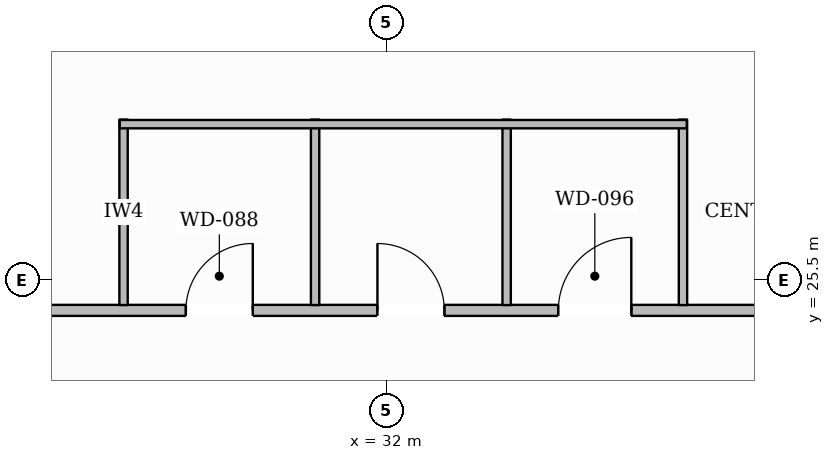
"""IFC4 building model, lengths in metres.
Left out: names, types, materials, properties, quantities, classifications, styles, units other than length and angle.
Written with IfcOpenShell. Run it as: python <this file> out.ifc"""

import sys

from ifc_helpers import new_model, si_unit, direction, frame, frame_2d, origin, place, context, subcontext, project, spatial, rectangle, extrude, element, fill, save


model = new_model("IFC4")
c1 = context("Model", 3, precision=1e-05, world=origin(), true_north=direction((0.0, 1.0)))
c2 = subcontext(c1, "Body", "Model", "MODEL_VIEW")
j1 = project(units=[si_unit("LENGTHUNIT", "METRE"), si_unit("PLANEANGLEUNIT", "RADIAN")], contexts=[c1])
p1 = place(None, origin())
s1 = spatial("IfcSite", under=j1, at=p1, CompositionType="ELEMENT")
p2 = place(p1, origin())
s2 = spatial("IfcBuilding", under=s1, at=p2, CompositionType="ELEMENT")
p3 = place(p2, frame((0.0, 0.0, 6.0)))
s3 = spatial("IfcBuildingStorey", under=s2, at=p3, CompositionType="ELEMENT", Elevation=6.0)
p4 = place(p3, frame((13.007, 15.062, 0.0), z_axis=(0.0, 0.0, 1.0), x_axis=(0.502349968378, 0.86466439112, 0.0)))
e1 = element("IfcWall", 1, at=p4, inside=s3, PredefinedType="STANDARD", context=c2, shape_type="SweptSolid", body=[
    extrude(rectangle(XDim=33.229, YDim=0.38, at=frame_2d((16.615, 0.0))), origin(), (0.0, 0.0, 1.0), 2.97),
])
p5 = place(p4, frame((29.24, 0.0, 0.65)))
e2 = element("IfcOpeningElement", 2, at=p5, cuts=e1, PredefinedType="OPENING", context=c2, shape_type="SweptSolid", body=[
    extrude(rectangle(XDim=1.65, YDim=1.75, at=frame_2d((0.825, 0.875))), frame((0.0, 0.2, 0.0), z_axis=(0.0, -1.0, 0.0), x_axis=(1.0, 0.0, 0.0)), (0.0, 0.0, 1.0), 0.4),
])
p6 = place(p4, frame((23.861, 0.0, 0.65)))
e3 = element("IfcOpeningElement", 3, at=p6, cuts=e1, PredefinedType="OPENING", context=c2, shape_type="SweptSolid", body=[
    extrude(rectangle(XDim=1.65, YDim=1.75, at=frame_2d((0.825, 0.875))), frame((0.0, 0.2, 0.0), z_axis=(0.0, -1.0, 0.0), x_axis=(1.0, 0.0, 0.0)), (0.0, 0.0, 1.0), 0.4),
])
p7 = place(p4, frame((13.101, 0.0, 0.65)))
e4 = element("IfcOpeningElement", 4, at=p7, cuts=e1, PredefinedType="OPENING", context=c2, shape_type="SweptSolid", body=[
    extrude(rectangle(XDim=1.65, YDim=1.75, at=frame_2d((0.825, 0.875))), frame((0.0, 0.2, 0.0), z_axis=(0.0, -1.0, 0.0), x_axis=(1.0, 0.0, 0.0)), (0.0, 0.0, 1.0), 0.4),
])
p8 = place(p4, frame((7.722, 0.0, 0.65)))
e5 = element("IfcOpeningElement", 5, at=p8, cuts=e1, PredefinedType="OPENING", context=c2, shape_type="SweptSolid", body=[
    extrude(rectangle(XDim=1.65, YDim=1.75, at=frame_2d((0.825, 0.875))), frame((0.0, 0.2, 0.0), z_axis=(0.0, -1.0, 0.0), x_axis=(1.0, 0.0, 0.0)), (0.0, 0.0, 1.0), 0.4),
])
p9 = place(p4, frame((2.342, 0.0, 0.65)))
e6 = element("IfcOpeningElement", 6, at=p9, cuts=e1, PredefinedType="OPENING", context=c2, shape_type="SweptSolid", body=[
    extrude(rectangle(XDim=1.65, YDim=1.75, at=frame_2d((0.825, 0.875))), frame((0.0, 0.2, 0.0), z_axis=(0.0, -1.0, 0.0), x_axis=(1.0, 0.0, 0.0)), (0.0, 0.0, 1.0), 0.4),
])
p10 = place(p3, frame((25.98, 25.1, 0.0), z_axis=(0.0, 0.0, 1.0), x_axis=(1.0, 0.0, 0.0)))
e7 = element("IfcWall", 7, at=p10, inside=s3, PredefinedType="PARTITIONING", context=c2, shape_type="SweptSolid", body=[
    extrude(rectangle(XDim=11.02, YDim=0.145, at=frame_2d((5.51, 0.0))), origin(), (0.0, 0.0, 1.0), 3.59),
])
p11 = place(p10, frame((3.38, 0.0, 0.0)))
e8 = element("IfcOpeningElement", 8, at=p11, cuts=e7, PredefinedType="OPENING", context=c2, shape_type="SweptSolid", body=[
    extrude(rectangle(XDim=0.88, YDim=2.1, at=frame_2d((0.44, 1.05))), frame((0.0, 0.083, 0.0), z_axis=(0.0, -1.0, 0.0), x_axis=(1.0, 0.0, 0.0)), (0.0, 0.0, 1.0), 0.165),
])
p12 = place(p10, frame((5.9, 0.0, 0.0)))
e9 = element("IfcOpeningElement", 9, at=p12, cuts=e7, PredefinedType="OPENING", context=c2, shape_type="SweptSolid", body=[
    extrude(rectangle(XDim=0.88, YDim=2.1, at=frame_2d((0.44, 1.05))), frame((0.0, 0.083, 0.0), z_axis=(0.0, -1.0, 0.0), x_axis=(1.0, 0.0, 0.0)), (0.0, 0.0, 1.0), 0.165),
])
p13 = place(p10, frame((8.28, 0.0, 0.0)))
e10 = element("IfcOpeningElement", 10, at=p13, cuts=e7, PredefinedType="OPENING", context=c2, shape_type="SweptSolid", body=[
    extrude(rectangle(XDim=0.96, YDim=2.1, at=frame_2d((0.48, 1.05))), frame((0.0, 0.083, 0.0), z_axis=(0.0, -1.0, 0.0), x_axis=(1.0, 0.0, 0.0)), (0.0, 0.0, 1.0), 0.165),
])
p14 = place(p3, frame((28.54, 25.17, 0.0), z_axis=(0.0, 0.0, 1.0), x_axis=(0.0, 1.0, 0.0)))
e11 = element("IfcWall", 11, at=p14, inside=s3, PredefinedType="PLUMBINGWALL", context=c2, shape_type="SweptSolid", body=[
    extrude(rectangle(XDim=2.44, YDim=0.11, at=frame_2d((1.22, 0.0))), origin(), (0.0, 0.0, 1.0), 3.057),
])
for number, where, z_axis, x_axis in (
    (12, (31.06, 25.17, 0.0), (0.0, 0.0, 1.0), (0.0, 1.0, 0.0)),
    (13, (33.58, 25.17, 0.0), (0.0, 0.0, 1.0), (0.0, 1.0, 0.0)),
    (14, (35.9, 25.17, 0.0), (0.0, 0.0, 1.0), (0.0, 1.0, 0.0)),
):
    element("IfcWall", number, at=place(p3, frame(where, z_axis=z_axis, x_axis=x_axis)), inside=s3, PredefinedType="PLUMBINGWALL", context=c2, shape_type="SweptSolid", body=[
        extrude(rectangle(XDim=2.44, YDim=0.11, at=frame_2d((1.22, 0.0))), origin(), (0.0, 0.0, 1.0), 3.59),
    ])
p15 = place(p3, frame((28.49, 27.55, 0.0), z_axis=(0.0, 0.0, 1.0), x_axis=(1.0, 0.0, 0.0)))
e15 = element("IfcWall", 15, at=p15, inside=s3, PredefinedType="PLUMBINGWALL", context=c2, shape_type="SweptSolid", body=[
    extrude(rectangle(XDim=7.46, YDim=0.11, at=frame_2d((3.73, 0.0))), origin(), (0.0, 0.0, 1.0), 3.59),
])
p16 = place(p11, origin())
e16 = element("IfcDoor", 16, at=p16, inside=s3, OperationType="SINGLE_SWING_RIGHT", PredefinedType="DOOR", context=c2, shape_type="SweptSolid", body=[
    extrude(rectangle(XDim=0.88, YDim=2.1, at=frame_2d((0.44, 1.05))), frame((0.0, 0.025, 0.0), z_axis=(0.0, -1.0, 0.0), x_axis=(1.0, 0.0, 0.0)), (0.0, 0.0, 1.0), 0.05),
])
fill(e8, e16)
p17 = place(p12, origin())
e17 = element("IfcDoor", 17, at=p17, inside=s3, OperationType="SINGLE_SWING_LEFT", PredefinedType="DOOR", context=c2, shape_type="SweptSolid", body=[
    extrude(rectangle(XDim=0.88, YDim=2.1, at=frame_2d((0.44, 1.05))), frame((0.0, 0.025, 0.0), z_axis=(0.0, -1.0, 0.0), x_axis=(1.0, 0.0, 0.0)), (0.0, 0.0, 1.0), 0.05),
])
fill(e9, e17)
p18 = place(p13, origin())
e18 = element("IfcDoor", 18, at=p18, inside=s3, OperationType="SINGLE_SWING_RIGHT", PredefinedType="DOOR", context=c2, shape_type="SweptSolid", body=[
    extrude(rectangle(XDim=0.96, YDim=2.1, at=frame_2d((0.48, 1.05))), frame((0.0, 0.025, 0.0), z_axis=(0.0, -1.0, 0.0), x_axis=(1.0, 0.0, 0.0)), (0.0, 0.0, 1.0), 0.05),
])
fill(e10, e18)
save(model, sys.argv[1])
